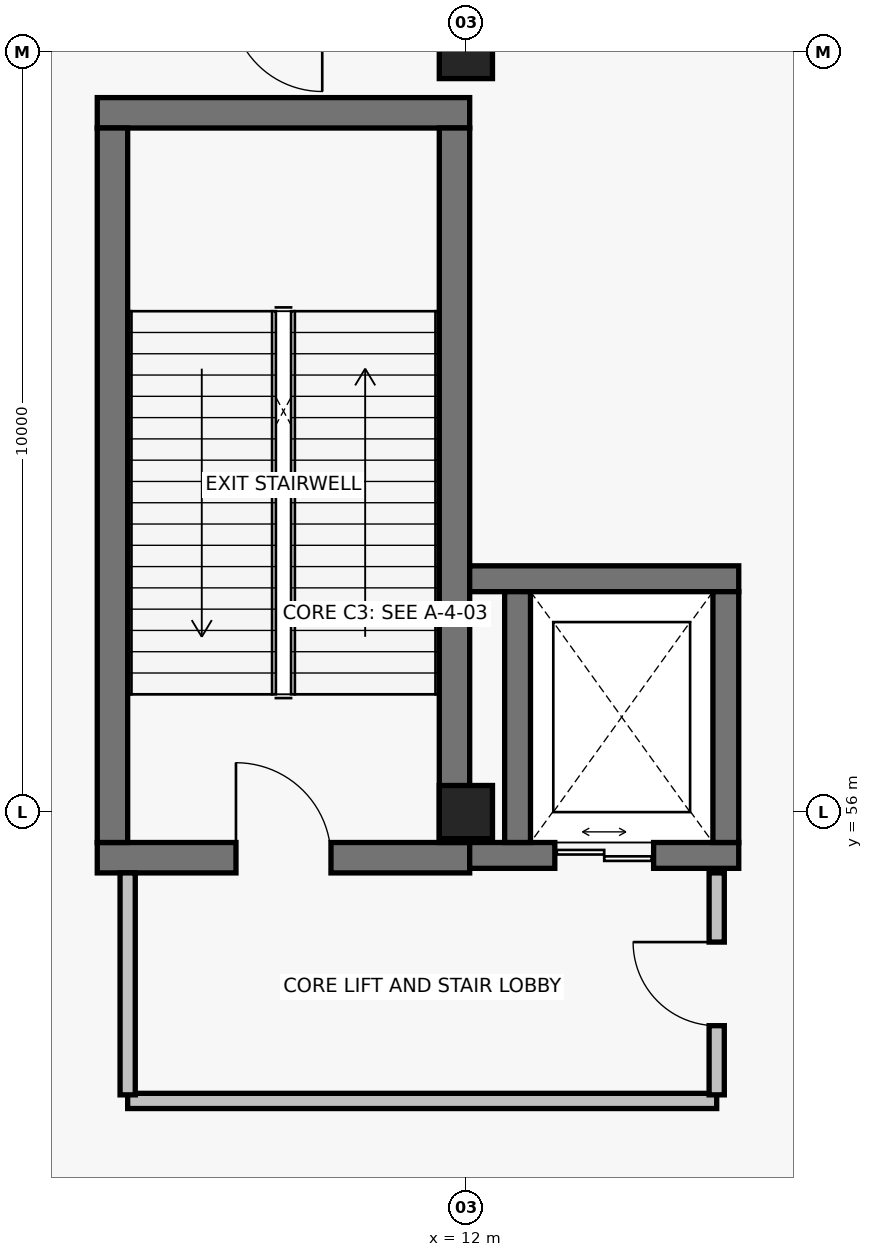
"""IFC4 building model, lengths in metres.
Left out: names, types, materials, properties, quantities, classifications, styles, units other than length and angle.
Written with IfcOpenShell. Run it as: python <this file> out.ifc"""

import sys

from ifc_helpers import new_model, si_unit, direction, frame, frame_2d, origin, origin_2d, place, context, subcontext, project, spatial, rectangle, extrude, element, fill, save


model = new_model("IFC4")
c1 = context("Model", 3, precision=1e-05, world=origin(), true_north=direction((0.0, 1.0)))
c2 = subcontext(c1, "Body", "Model", "MODEL_VIEW")
j1 = project(units=[si_unit("LENGTHUNIT", "METRE"), si_unit("PLANEANGLEUNIT", "RADIAN")], contexts=[c1])
p1 = place(None, origin())
s1 = spatial("IfcSite", under=j1, at=p1, CompositionType="ELEMENT")
p2 = place(p1, origin())
s2 = spatial("IfcBuilding", under=s1, at=p2, CompositionType="ELEMENT")
p3 = place(p2, origin())
s3 = spatial("IfcBuildingStorey", under=s2, at=p3, CompositionType="ELEMENT", Elevation=0.0)
for number, where, z_axis, x_axis in (
    (1, (12.0, 56.0, 0.0), (0.0, 0.0, 1.0), (1.0, 0.0, 0.0)),
    (2, (12.0, 66.0, 0.0), (0.0, 0.0, 1.0), (1.0, 0.0, 0.0)),
):
    element("IfcColumn", number, at=place(p3, frame(where, z_axis=z_axis, x_axis=x_axis)), inside=s3, PredefinedType="COLUMN", context=c2, shape_type="SweptSolid", body=[
        extrude(rectangle(XDim=0.7, YDim=0.7, at=origin_2d()), origin(), (0.0, 0.0, 1.0), 6.6),
    ])
p4 = place(p3, frame((7.15, 55.4, 0.0), z_axis=(0.0, 0.0, 1.0), x_axis=(1.0, 0.0, 0.0)))
e3 = element("IfcWall", 3, at=p4, inside=s3, PredefinedType="SHEAR", context=c2, shape_type="SweptSolid", body=[
    extrude(rectangle(XDim=4.9, YDim=0.4, at=frame_2d((2.45, 0.0))), origin(), (0.0, 0.0, 1.0), 6.32),
])
p5 = place(p4, frame((1.825, 0.0, 0.0)))
e4 = element("IfcOpeningElement", 4, at=p5, cuts=e3, PredefinedType="OPENING", context=c2, shape_type="SweptSolid", body=[
    extrude(rectangle(XDim=1.25, YDim=2.2, at=frame_2d((0.625, 1.1))), frame((0.0, 0.215, 0.0), z_axis=(0.0, -1.0, 0.0), x_axis=(1.0, 0.0, 0.0)), (0.0, 0.0, 1.0), 0.43),
])
p6 = place(p3, frame((12.05, 65.2, 0.0), z_axis=(0.0, 0.0, 1.0), x_axis=(-1.0, 0.0, 0.0)))
e5 = element("IfcWall", 5, at=p6, inside=s3, PredefinedType="SHEAR", context=c2, shape_type="SweptSolid", body=[
    extrude(rectangle(XDim=4.9, YDim=0.4, at=frame_2d((2.45, 0.0))), origin(), (0.0, 0.0, 1.0), 6.32),
])
for number, where, z_axis, x_axis in (
    (6, (7.35, 65.0, 0.0), (0.0, 0.0, 1.0), (0.0, -1.0, 0.0)),
    (7, (11.85, 55.6, 0.0), (0.0, 0.0, 1.0), (0.0, 1.0, 0.0)),
):
    element("IfcWall", number, at=place(p3, frame(where, z_axis=z_axis, x_axis=x_axis)), inside=s3, PredefinedType="SHEAR", context=c2, shape_type="SweptSolid", body=[
        extrude(rectangle(XDim=9.4, YDim=0.4, at=frame_2d((4.7, 0.0))), origin(), (0.0, 0.0, 1.0), 6.32),
    ])
p7 = place(p3, frame((12.05, 55.43, 0.0), z_axis=(0.0, 0.0, 1.0), x_axis=(1.0, 0.0, 0.0)))
e8 = element("IfcWall", 8, at=p7, inside=s3, PredefinedType="SHEAR", context=c2, shape_type="SweptSolid", body=[
    extrude(rectangle(XDim=3.54, YDim=0.34, at=frame_2d((1.77, 0.0))), origin(), (0.0, 0.0, 1.0), 6.32),
])
p8 = place(p7, frame((1.12, 0.0, 0.0)))
e9 = element("IfcOpeningElement", 9, at=p8, cuts=e8, PredefinedType="OPENING", context=c2, shape_type="SweptSolid", body=[
    extrude(rectangle(XDim=1.3, YDim=2.25, at=frame_2d((0.65, 1.125))), frame((0.0, 0.185, 0.0), z_axis=(0.0, -1.0, 0.0), x_axis=(1.0, 0.0, 0.0)), (0.0, 0.0, 1.0), 0.37),
])
p9 = place(p3, frame((15.59, 59.07, 0.0), z_axis=(0.0, 0.0, 1.0), x_axis=(-1.0, 0.0, 0.0)))
e10 = element("IfcWall", 10, at=p9, inside=s3, PredefinedType="SHEAR", context=c2, shape_type="SweptSolid", body=[
    extrude(rectangle(XDim=3.54, YDim=0.34, at=frame_2d((1.77, 0.0))), origin(), (0.0, 0.0, 1.0), 6.32),
])
for number, where, z_axis, x_axis in (
    (11, (12.68, 58.9, 0.0), (0.0, 0.0, 1.0), (0.0, -1.0, 0.0)),
    (12, (15.42, 55.6, 0.0), (0.0, 0.0, 1.0), (0.0, 1.0, 0.0)),
):
    element("IfcWall", number, at=place(p3, frame(where, z_axis=z_axis, x_axis=x_axis)), inside=s3, PredefinedType="SHEAR", context=c2, shape_type="SweptSolid", body=[
        extrude(rectangle(XDim=3.3, YDim=0.34, at=frame_2d((1.65, 0.0))), origin(), (0.0, 0.0, 1.0), 6.32),
    ])
p10 = place(p3, frame((7.55, 52.2, 0.0), z_axis=(0.0, 0.0, 1.0), x_axis=(1.0, 0.0, 0.0)))
e13 = element("IfcWall", 13, at=p10, inside=s3, PredefinedType="PARTITIONING", context=c2, shape_type="SweptSolid", body=[
    extrude(rectangle(XDim=7.75, YDim=0.2, at=frame_2d((3.875, 0.0))), origin(), (0.0, 0.0, 1.0), 5.607),
])
p11 = place(p3, frame((7.55, 55.2, 0.0), z_axis=(0.0, 0.0, 1.0), x_axis=(0.0, -1.0, 0.0)))
e14 = element("IfcWall", 14, at=p11, inside=s3, PredefinedType="PARTITIONING", context=c2, shape_type="SweptSolid", body=[
    extrude(rectangle(XDim=2.92, YDim=0.2, at=frame_2d((1.46, 0.0))), origin(), (0.0, 0.0, 1.0), 6.32),
])
p12 = place(p3, frame((15.3, 52.28, 0.0), z_axis=(0.0, 0.0, 1.0), x_axis=(0.0, 1.0, 0.0)))
e15 = element("IfcWall", 15, at=p12, inside=s3, PredefinedType="PARTITIONING", context=c2, shape_type="SweptSolid", body=[
    extrude(rectangle(XDim=2.92, YDim=0.2, at=frame_2d((1.46, 0.0))), origin(), (0.0, 0.0, 1.0), 6.32),
])
p13 = place(p12, frame((0.91, 0.0, 0.0)))
e16 = element("IfcOpeningElement", 16, at=p13, cuts=e15, PredefinedType="OPENING", context=c2, shape_type="SweptSolid", body=[
    extrude(rectangle(XDim=1.1, YDim=2.15, at=frame_2d((0.55, 1.075))), frame((0.0, 0.115, 0.0), z_axis=(0.0, -1.0, 0.0), x_axis=(1.0, 0.0, 0.0)), (0.0, 0.0, 1.0), 0.23),
])
p14 = place(p5, origin())
e17 = element("IfcDoor", 17, at=p14, inside=s3, OperationType="SINGLE_SWING_LEFT", PredefinedType="DOOR", context=c2, shape_type="SweptSolid", body=[
    extrude(rectangle(XDim=1.25, YDim=2.2, at=frame_2d((0.625, 1.1))), frame((0.0, 0.025, 0.0), z_axis=(0.0, -1.0, 0.0), x_axis=(1.0, 0.0, 0.0)), (0.0, 0.0, 1.0), 0.05),
])
fill(e4, e17)
p15 = place(p8, origin())
e18 = element("IfcDoor", 18, at=p15, inside=s3, OperationType="DOUBLE_DOOR_SLIDING", PredefinedType="DOOR", context=c2, shape_type="SweptSolid", body=[
    extrude(rectangle(XDim=1.3, YDim=2.25, at=frame_2d((0.65, 1.125))), frame((0.0, 0.025, 0.0), z_axis=(0.0, -1.0, 0.0), x_axis=(1.0, 0.0, 0.0)), (0.0, 0.0, 1.0), 0.05),
])
fill(e9, e18)
p16 = place(p13, origin())
e19 = element("IfcDoor", 19, at=p16, inside=s3, OperationType="SINGLE_SWING_RIGHT", PredefinedType="DOOR", context=c2, shape_type="SweptSolid", body=[
    extrude(rectangle(XDim=1.1, YDim=2.15, at=frame_2d((0.55, 1.075))), frame((0.0, 0.025, 0.0), z_axis=(0.0, -1.0, 0.0), x_axis=(1.0, 0.0, 0.0)), (0.0, 0.0, 1.0), 0.05),
])
fill(e16, e19)
save(model, sys.argv[1])
